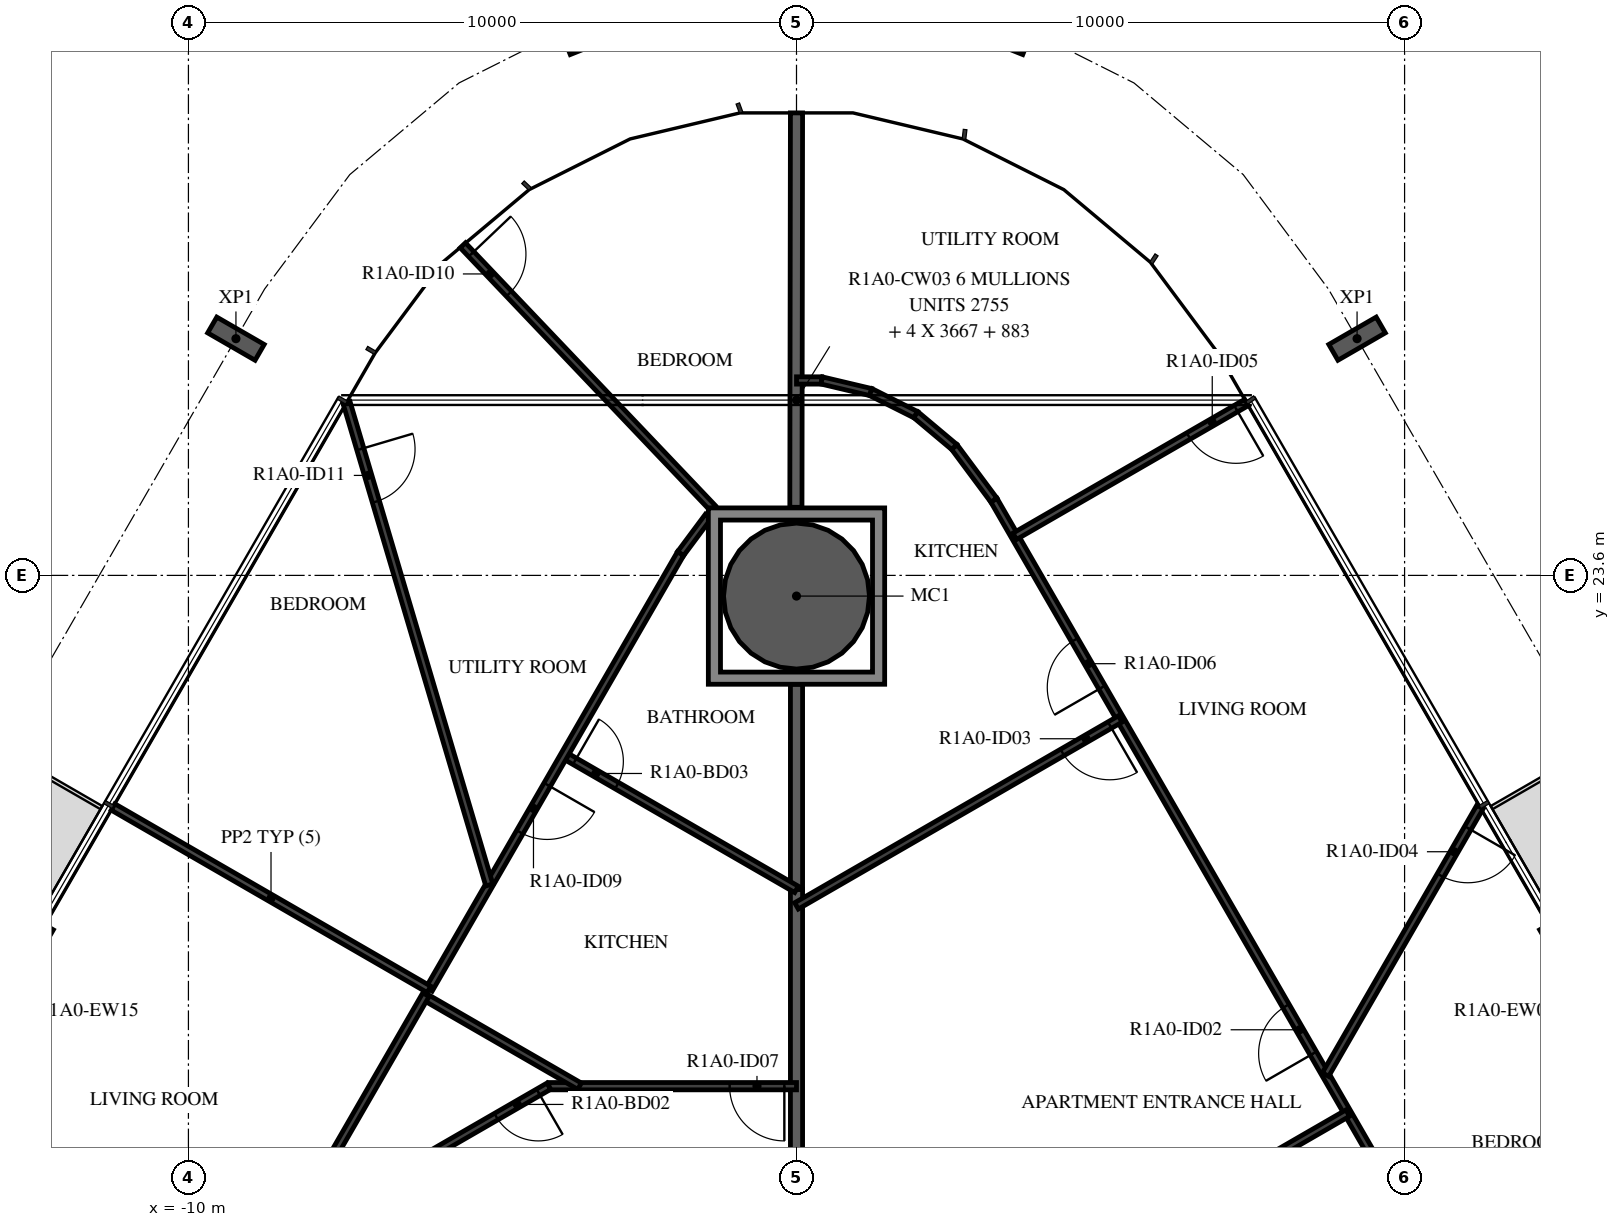
"""IFC4 building model, lengths in metres.
Left out: names, types, materials, properties, quantities, classifications, styles, units other than length and angle.
Written with IfcOpenShell. Run it as: python <this file> out.ifc"""

import sys

from ifc_helpers import new_model, si_unit, direction, frame, frame_2d, origin, origin_2d, place, context, subcontext, project, spatial, polyline, rectangle, hollow_circle, i_section, outline, extrude, element, fill, save


model = new_model("IFC4")
c1 = context("Model", 3, precision=1e-05, world=origin(), true_north=direction((0.0, 1.0)))
c2 = subcontext(c1, "Body", "Model", "MODEL_VIEW")
j1 = project(units=[si_unit("LENGTHUNIT", "METRE"), si_unit("PLANEANGLEUNIT", "RADIAN")], contexts=[c1])
p1 = place(None, origin())
s1 = spatial("IfcSite", under=j1, at=p1, CompositionType="ELEMENT")
p2 = place(p1, origin())
s2 = spatial("IfcBuilding", under=s1, at=p2, CompositionType="ELEMENT")
p3 = place(p2, frame((0.0, 0.0, 45.4)))
s3 = spatial("IfcBuildingStorey", under=s2, at=p3, CompositionType="ELEMENT", Elevation=45.4)
p4 = place(p3, frame((0.0, 23.26, -0.38), z_axis=(0.0, 0.0, 1.0), x_axis=(1.0, 0.0, 0.0)))
e1 = element("IfcColumn", 1, at=p4, inside=s3, PredefinedType="COLUMN", context=c2, shape_type="SweptSolid", body=[
    extrude(hollow_circle(Radius=1.2, WallThickness=0.06, at=origin_2d()), origin(), (0.0, 0.0, 1.0), 3.5),
])
for number, where, z_axis, x_axis in (
    (2, (9.219, 27.493, -0.38), (0.0, 0.0, 1.0), (0.5, -0.866, 0.0)),
    (3, (3.748, 32.639, -0.38), (0.0, 0.0, 1.0), (0.929, -0.371, 0.0)),
    (4, (-3.748, 32.639, -0.38), (0.0, 0.0, 1.0), (0.929, 0.371, 0.0)),
    (5, (-9.219, 27.493, -0.38), (0.0, 0.0, 1.0), (0.5, 0.866, 0.0)),
):
    element("IfcColumn", number, at=place(p3, frame(where, z_axis=z_axis, x_axis=x_axis)), inside=s3, PredefinedType="COLUMN", context=c2, shape_type="SweptSolid", body=[
        extrude(i_section(OverallWidth=0.3, OverallDepth=0.9, WebThickness=0.019, FlangeThickness=0.035, FilletRadius=0.03, at=origin_2d()), origin(), (0.0, 0.0, 1.0), 3.5),
    ])
p5 = place(p3, frame((13.891, 15.041, 0.0), z_axis=(0.0, 0.0, 1.0), x_axis=(-0.499971222258, 0.866042017984, 0.0)))
e6 = element("IfcWall", 6, at=p5, inside=s3, PredefinedType="STANDARD", context=c2, shape_type="SweptSolid", body=[
    extrude(rectangle(XDim=3.2, YDim=0.16, at=frame_2d((1.6, 0.0))), origin(), (0.0, 0.0, 1.0), 3.12),
])
p6 = place(p5, frame((0.4, 0.0, 0.0)))
e7 = element("IfcOpeningElement", 7, at=p6, cuts=e6, PredefinedType="OPENING", context=c2, shape_type="SweptSolid", body=[
    extrude(rectangle(XDim=2.4, YDim=2.4, at=frame_2d((1.2, 1.2))), frame((0.0, 0.09, 0.0), z_axis=(0.0, -1.0, 0.0), x_axis=(1.0, 0.0, 0.0)), (0.0, 0.0, 1.0), 0.18),
])
p7 = place(p3, frame((-12.291, 17.812, 0.0), z_axis=(0.0, 0.0, 1.0), x_axis=(-0.499971222258, -0.866042017984, 0.0)))
e8 = element("IfcWall", 8, at=p7, inside=s3, PredefinedType="STANDARD", context=c2, shape_type="SweptSolid", body=[
    extrude(rectangle(XDim=3.2, YDim=0.16, at=frame_2d((1.6, 0.0))), origin(), (0.0, 0.0, 1.0), 3.12),
])
p8 = place(p7, frame((0.4, 0.0, 0.0)))
e9 = element("IfcOpeningElement", 9, at=p8, cuts=e8, PredefinedType="OPENING", context=c2, shape_type="SweptSolid", body=[
    extrude(rectangle(XDim=2.4, YDim=2.4, at=frame_2d((1.2, 1.2))), frame((0.0, 0.09, 0.0), z_axis=(0.0, -1.0, 0.0), x_axis=(1.0, 0.0, 0.0)), (0.0, 0.0, 1.0), 0.18),
])
p9 = place(p3, frame((0.0, 18.437, 0.0), z_axis=(0.0, 0.0, 1.0), x_axis=(0.0, -1.0, 0.0)))
e10 = element("IfcWall", 10, at=p9, inside=s3, PredefinedType="STANDARD", context=c2, shape_type="SweptSolid", body=[
    extrude(rectangle(XDim=4.737, YDim=0.2, at=frame_2d((2.368, 0.0))), origin(), (0.0, 0.0, 1.0), 3.12),
])
p10 = place(p3, frame((0.0, 31.206, 0.0), z_axis=(0.0, 0.0, 1.0), x_axis=(-0.001543266126, -0.999998809164, 0.0)))
e11 = element("IfcWall", 11, at=p10, inside=s3, PredefinedType="STANDARD", context=c2, shape_type="SweptSolid", body=[
    extrude(rectangle(XDim=6.486, YDim=0.2, at=frame_2d((3.243, 0.0))), origin(), (0.0, 0.0, 1.0), 3.12),
])
p11 = place(p3, frame((0.0, 21.81, 0.0), z_axis=(0.0, 0.0, 1.0), x_axis=(0.0, -1.0, 0.0)))
e12 = element("IfcWall", 12, at=p11, inside=s3, PredefinedType="STANDARD", context=c2, shape_type="SweptSolid", body=[
    extrude(rectangle(XDim=3.373, YDim=0.2, at=frame_2d((1.687, 0.0))), origin(), (0.0, 0.0, 1.0), 3.12),
])
p12 = place(p3, frame((11.139, 11.167, 0.0), z_axis=(0.0, 0.0, 1.0), x_axis=(-0.499994660107, 0.866028486751, 0.0)))
e13 = element("IfcWall", 13, at=p12, inside=s3, PredefinedType="PARTITIONING", context=c2, shape_type="SweptSolid", body=[
    extrude(rectangle(XDim=15.786, YDim=0.12, at=frame_2d((7.893, 0.0))), origin(), (0.0, 0.0, 1.0), 3.12),
])
p13 = place(p12, frame((5.279, 0.0, 0.0)))
e14 = element("IfcOpeningElement", 14, at=p13, cuts=e13, PredefinedType="OPENING", context=c2, shape_type="SweptSolid", body=[
    extrude(rectangle(XDim=0.9, YDim=2.1, at=frame_2d((0.45, 1.05))), frame((0.0, 0.07, 0.0), z_axis=(0.0, -1.0, 0.0), x_axis=(1.0, 0.0, 0.0)), (0.0, 0.0, 1.0), 0.14),
])
p14 = place(p12, frame((12.23, 0.0, 0.0)))
e15 = element("IfcOpeningElement", 15, at=p14, cuts=e13, PredefinedType="OPENING", context=c2, shape_type="SweptSolid", body=[
    extrude(rectangle(XDim=0.9, YDim=2.1, at=frame_2d((0.45, 1.05))), frame((0.0, 0.07, 0.0), z_axis=(0.0, -1.0, 0.0), x_axis=(1.0, 0.0, 0.0)), (0.0, 0.0, 1.0), 0.14),
])
p15 = place(p3, frame((6.952, 13.538, 0.0), z_axis=(0.0, 0.0, 1.0), x_axis=(0.866030657337, 0.49999090047, 0.0)))
e16 = element("IfcWall", 16, at=p15, inside=s3, PredefinedType="PARTITIONING", context=c2, shape_type="SweptSolid", body=[
    extrude(rectangle(XDim=2.44, YDim=0.12, at=frame_2d((1.22, 0.0))), origin(), (0.0, 0.0, 1.0), 3.12),
])
p16 = place(p3, frame((5.324, 21.239, 0.0), z_axis=(0.0, 0.0, 1.0), x_axis=(-0.866030172657, -0.49999173998, 0.0)))
e17 = element("IfcWall", 17, at=p16, inside=s3, PredefinedType="PARTITIONING", context=c2, shape_type="SweptSolid", body=[
    extrude(rectangle(XDim=6.147, YDim=0.12, at=frame_2d((3.074, 0.0))), origin(), (0.0, 0.0, 1.0), 3.12),
])
p17 = place(p16, frame((0.2, 0.0, 0.0)))
e18 = element("IfcOpeningElement", 18, at=p17, cuts=e17, PredefinedType="OPENING", context=c2, shape_type="SweptSolid", body=[
    extrude(rectangle(XDim=0.9, YDim=2.1, at=frame_2d((0.45, 1.05))), frame((0.0, 0.07, 0.0), z_axis=(0.0, -1.0, 0.0), x_axis=(1.0, 0.0, 0.0)), (0.0, 0.0, 1.0), 0.14),
])
p18 = place(p3, frame((11.24, 19.792, 0.0), z_axis=(0.0, 0.0, 1.0), x_axis=(-0.499978956711, -0.866037552792, 0.0)))
e19 = element("IfcWall", 19, at=p18, inside=s3, PredefinedType="PARTITIONING", context=c2, shape_type="SweptSolid", body=[
    extrude(rectangle(XDim=5.081, YDim=0.12, at=frame_2d((2.541, 0.0))), origin(), (0.0, 0.0, 1.0), 3.12),
])
p19 = place(p18, frame((0.4, 0.0, 0.0)))
e20 = element("IfcOpeningElement", 20, at=p19, cuts=e19, PredefinedType="OPENING", context=c2, shape_type="SweptSolid", body=[
    extrude(rectangle(XDim=0.9, YDim=2.1, at=frame_2d((0.45, 1.05))), frame((0.0, 0.07, 0.0), z_axis=(0.0, -1.0, 0.0), x_axis=(1.0, 0.0, 0.0)), (0.0, 0.0, 1.0), 0.14),
])
p20 = place(p3, frame((7.4, 26.443, 0.0), z_axis=(0.0, 0.0, 1.0), x_axis=(-0.866032203192, -0.499988222896, 0.0)))
e21 = element("IfcWall", 21, at=p20, inside=s3, PredefinedType="PARTITIONING", context=c2, shape_type="SweptSolid", body=[
    extrude(rectangle(XDim=4.4, YDim=0.12, at=frame_2d((2.2, 0.0))), origin(), (0.0, 0.0, 1.0), 2.73),
])
p21 = place(p20, frame((0.2, 0.0, 0.0)))
e22 = element("IfcOpeningElement", 22, at=p21, cuts=e21, PredefinedType="OPENING", context=c2, shape_type="SweptSolid", body=[
    extrude(rectangle(XDim=0.9, YDim=2.1, at=frame_2d((0.45, 1.05))), frame((0.0, 0.07, 0.0), z_axis=(0.0, -1.0, 0.0), x_axis=(1.0, 0.0, 0.0)), (0.0, 0.0, 1.0), 0.14),
])
p22 = place(p3, frame((0.0, 26.806, 0.0), z_axis=(0.0, 0.0, 1.0), x_axis=(1.0, 0.0, 0.0)))
e23 = element("IfcWall", 23, at=p22, inside=s3, PredefinedType="PARTITIONING", context=c2, shape_type="SweptSolid", body=[
    extrude(rectangle(XDim=0.415, YDim=0.12, at=frame_2d((0.207, 0.0))), origin(), (0.0, 0.0, 1.0), 3.12),
])
p23 = place(p3, frame((0.415, 26.806, 0.0), z_axis=(0.0, 0.0, 1.0), x_axis=(0.973048993259, -0.230598475097, 0.0)))
e24 = element("IfcWall", 24, at=p23, inside=s3, PredefinedType="PARTITIONING", context=c2, shape_type="SweptSolid", body=[
    extrude(rectangle(XDim=0.829, YDim=0.12, at=frame_2d((0.415, 0.0))), origin(), (0.0, 0.0, 1.0), 3.12),
])
for number, where, z_axis, x_axis in (
    (25, (1.221, 26.615, 0.0), (0.0, 0.0, 1.0), (0.894, -0.449, 0.0)),
    (26, (1.962, 26.243, 0.0), (0.0, 0.0, 1.0), (0.766, -0.643, 0.0)),
):
    element("IfcWall", number, at=place(p3, frame(where, z_axis=z_axis, x_axis=x_axis)), inside=s3, PredefinedType="PARTITIONING", context=c2, shape_type="SweptSolid", body=[
        extrude(rectangle(XDim=0.829, YDim=0.12, at=frame_2d((0.415, 0.0))), origin(), (0.0, 0.0, 1.0), 3.12),
    ])
p24 = place(p3, frame((2.597, 25.71, 0.0), z_axis=(0.0, 0.0, 1.0), x_axis=(0.59722925597, -0.802070580319, 0.0)))
e27 = element("IfcWall", 27, at=p24, inside=s3, PredefinedType="PARTITIONING", context=c2, shape_type="SweptSolid", body=[
    extrude(rectangle(XDim=1.087, YDim=0.12, at=frame_2d((0.543, 0.0))), origin(), (0.0, 0.0, 1.0), 3.12),
])
p25 = place(p3, frame((0.0, 15.2, 0.0), z_axis=(0.0, 0.0, 1.0), x_axis=(-1.0, 0.0, 0.0)))
e28 = element("IfcWall", 28, at=p25, inside=s3, PredefinedType="PARTITIONING", context=c2, shape_type="SweptSolid", body=[
    extrude(rectangle(XDim=4.073, YDim=0.12, at=frame_2d((2.036, 0.0))), origin(), (0.0, 0.0, 1.0), 3.12),
])
p26 = place(p25, frame((0.2, 0.0, 0.0)))
e29 = element("IfcOpeningElement", 29, at=p26, cuts=e28, PredefinedType="OPENING", context=c2, shape_type="SweptSolid", body=[
    extrude(rectangle(XDim=0.9, YDim=2.1, at=frame_2d((0.45, 1.05))), frame((0.0, 0.07, 0.0), z_axis=(0.0, -1.0, 0.0), x_axis=(1.0, 0.0, 0.0)), (0.0, 0.0, 1.0), 0.14),
])
p27 = place(p3, frame((-4.073, 15.2, 0.0), z_axis=(0.0, 0.0, 1.0), x_axis=(-0.866024802457, -0.500001041529, 0.0)))
e30 = element("IfcWall", 30, at=p27, inside=s3, PredefinedType="PARTITIONING", context=c2, shape_type="SweptSolid", body=[
    extrude(rectangle(XDim=6.751, YDim=0.12, at=frame_2d((3.376, 0.0))), origin(), (0.0, 0.0, 1.0), 3.12),
])
p28 = place(p27, frame((0.2, 0.0, 0.0)))
e31 = element("IfcOpeningElement", 31, at=p28, cuts=e30, PredefinedType="OPENING", context=c2, shape_type="SweptSolid", body=[
    extrude(rectangle(XDim=0.8, YDim=2.1, at=frame_2d((0.4, 1.05))), frame((0.0, 0.07, 0.0), z_axis=(0.0, -1.0, 0.0), x_axis=(1.0, 0.0, 0.0)), (0.0, 0.0, 1.0), 0.14),
])
p29 = place(p27, frame((5.206, 0.0, 0.0)))
e32 = element("IfcOpeningElement", 32, at=p29, cuts=e30, PredefinedType="OPENING", context=c2, shape_type="SweptSolid", body=[
    extrude(rectangle(XDim=0.9, YDim=2.1, at=frame_2d((0.45, 1.05))), frame((0.0, 0.07, 0.0), z_axis=(0.0, -1.0, 0.0), x_axis=(1.0, 0.0, 0.0)), (0.0, 0.0, 1.0), 0.14),
])
p30 = place(p3, frame((-5.487, 29.028, 0.0), z_axis=(0.0, 0.0, 1.0), x_axis=(0.689189638576, -0.724581011398, 0.0)))
e33 = element("IfcWall", 33, at=p30, inside=s3, PredefinedType="PARTITIONING", context=c2, shape_type="SweptSolid", body=[
    extrude(rectangle(XDim=5.96, YDim=0.12, at=frame_2d((2.98, 0.0))), origin(), (0.0, 0.0, 1.0), 3.12),
])
p31 = place(p30, frame((0.2, 0.0, 0.0)))
e34 = element("IfcOpeningElement", 34, at=p31, cuts=e33, PredefinedType="OPENING", context=c2, shape_type="SweptSolid", body=[
    extrude(rectangle(XDim=0.9, YDim=2.1, at=frame_2d((0.45, 1.05))), frame((0.0, 0.07, 0.0), z_axis=(0.0, -1.0, 0.0), x_axis=(1.0, 0.0, 0.0)), (0.0, 0.0, 1.0), 0.14),
])
p32 = place(p3, frame((-3.821, 20.643, 0.0), z_axis=(0.0, 0.0, 1.0), x_axis=(0.866024310165, -0.5000018942, 0.0)))
e35 = element("IfcWall", 35, at=p32, inside=s3, PredefinedType="PARTITIONING", context=c2, shape_type="SweptSolid", body=[
    extrude(rectangle(XDim=4.412, YDim=0.12, at=frame_2d((2.206, 0.0))), origin(), (0.0, 0.0, 1.0), 3.12),
])
p33 = place(p32, frame((0.2, 0.0, 0.0)))
e36 = element("IfcOpeningElement", 36, at=p33, cuts=e35, PredefinedType="OPENING", context=c2, shape_type="SweptSolid", body=[
    extrude(rectangle(XDim=0.8, YDim=2.1, at=frame_2d((0.4, 1.05))), frame((0.0, 0.07, 0.0), z_axis=(0.0, -1.0, 0.0), x_axis=(1.0, 0.0, 0.0)), (0.0, 0.0, 1.0), 0.14),
])
p34 = place(p3, frame((-1.45, 24.571, 0.0), z_axis=(0.0, 0.0, 1.0), x_axis=(-0.597187509737, -0.802101663266, 0.0)))
e37 = element("IfcWall", 37, at=p34, inside=s3, PredefinedType="PARTITIONING", context=c2, shape_type="SweptSolid", body=[
    extrude(rectangle(XDim=0.765, YDim=0.12, at=frame_2d((0.382, 0.0))), origin(), (0.0, 0.0, 1.0), 3.12),
])
p35 = place(p3, frame((-1.907, 23.957, 0.0), z_axis=(0.0, 0.0, 1.0), x_axis=(-0.499994901178, -0.866028347571, 0.0)))
e38 = element("IfcWall", 38, at=p35, inside=s3, PredefinedType="PARTITIONING", context=c2, shape_type="SweptSolid", body=[
    extrude(rectangle(XDim=8.274, YDim=0.12, at=frame_2d((4.137, 0.0))), origin(), (0.0, 0.0, 1.0), 3.12),
])
p36 = place(p35, frame((4.387, 0.0, 0.0)))
e39 = element("IfcOpeningElement", 39, at=p36, cuts=e38, PredefinedType="OPENING", context=c2, shape_type="SweptSolid", body=[
    extrude(rectangle(XDim=0.9, YDim=2.1, at=frame_2d((0.45, 1.05))), frame((0.0, 0.07, 0.0), z_axis=(0.0, -1.0, 0.0), x_axis=(1.0, 0.0, 0.0)), (0.0, 0.0, 1.0), 0.14),
])
p37 = place(p3, frame((-6.114, 16.67, 0.0), z_axis=(0.0, 0.0, 1.0), x_axis=(0.866011328839, -0.500024377727, 0.0)))
e40 = element("IfcWall", 40, at=p37, inside=s3, PredefinedType="PARTITIONING", context=c2, shape_type="SweptSolid", body=[
    extrude(rectangle(XDim=2.94, YDim=0.12, at=frame_2d((1.47, 0.0))), origin(), (0.0, 0.0, 1.0), 3.12),
])
p38 = place(p3, frame((-7.4, 26.443, 0.0), z_axis=(0.0, 0.0, 1.0), x_axis=(0.283777867447, -0.95889004685, 0.0)))
e41 = element("IfcWall", 41, at=p38, inside=s3, PredefinedType="PARTITIONING", context=c2, shape_type="SweptSolid", body=[
    extrude(rectangle(XDim=8.274, YDim=0.12, at=frame_2d((4.137, 0.0))), origin(), (0.0, 0.0, 1.0), 3.12),
])
p39 = place(p38, frame((0.8, 0.0, 0.0)))
e42 = element("IfcOpeningElement", 42, at=p39, cuts=e41, PredefinedType="OPENING", context=c2, shape_type="SweptSolid", body=[
    extrude(rectangle(XDim=0.9, YDim=2.1, at=frame_2d((0.45, 1.05))), frame((0.0, 0.07, 0.0), z_axis=(0.0, -1.0, 0.0), x_axis=(1.0, 0.0, 0.0)), (0.0, 0.0, 1.0), 0.14),
])
p40 = place(p3, frame((-11.24, 19.792, 0.0), z_axis=(0.0, 0.0, 1.0), x_axis=(0.866031096941, -0.499990139034, 0.0)))
e43 = element("IfcWall", 43, at=p40, inside=s3, PredefinedType="PARTITIONING", context=c2, shape_type="SweptSolid", body=[
    extrude(rectangle(XDim=6.0, YDim=0.12, at=frame_2d((3.0, 0.0))), origin(), (0.0, 0.0, 1.0), 2.73),
])
p41 = place(p3, frame((-6.094, 16.705, 0.0), z_axis=(0.0, 0.0, 1.0), x_axis=(-0.500014747178, -0.86601688933, 0.0)))
e44 = element("IfcWall", 44, at=p41, inside=s3, PredefinedType="PARTITIONING", context=c2, shape_type="SweptSolid", body=[
    extrude(rectangle(XDim=4.627, YDim=0.12, at=frame_2d((2.313, 0.0))), origin(), (0.0, 0.0, 1.0), 3.12),
])
p42 = place(p3, origin())
e45 = element("IfcWall", 45, at=p42, inside=s3, PredefinedType="STANDARD", context=c2, shape_type="SweptSolid", body=[
    extrude(outline(polyline([(1.45, 24.71), (1.45, 21.81), (-1.45, 21.81), (-1.45, 24.71), (1.45, 24.71)]), holes=[polyline([(-1.25, 22.01), (1.25, 22.01), (1.25, 24.51), (-1.25, 24.51), (-1.25, 22.01)])]), origin(), (0.0, 0.0, 1.0), 3.12),
])
p43 = place(p13, origin())
e46 = element("IfcDoor", 46, at=p43, inside=s3, OperationType="SINGLE_SWING_RIGHT", PredefinedType="DOOR", context=c2, shape_type="SweptSolid", body=[
    extrude(rectangle(XDim=0.9, YDim=2.1, at=frame_2d((0.45, 1.05))), frame((0.0, 0.025, 0.0), z_axis=(0.0, -1.0, 0.0), x_axis=(1.0, 0.0, 0.0)), (0.0, 0.0, 1.0), 0.05),
])
fill(e14, e46)
p44 = place(p17, origin())
e47 = element("IfcDoor", 47, at=p44, inside=s3, OperationType="SINGLE_SWING_RIGHT", PredefinedType="DOOR", context=c2, shape_type="SweptSolid", body=[
    extrude(rectangle(XDim=0.9, YDim=2.1, at=frame_2d((0.45, 1.05))), frame((0.0, 0.025, 0.0), z_axis=(0.0, -1.0, 0.0), x_axis=(1.0, 0.0, 0.0)), (0.0, 0.0, 1.0), 0.05),
])
fill(e18, e47)
p45 = place(p19, origin())
e48 = element("IfcDoor", 48, at=p45, inside=s3, OperationType="SINGLE_SWING_LEFT", PredefinedType="DOOR", context=c2, shape_type="SweptSolid", body=[
    extrude(rectangle(XDim=0.9, YDim=2.1, at=frame_2d((0.45, 1.05))), frame((0.0, 0.025, 0.0), z_axis=(0.0, -1.0, 0.0), x_axis=(1.0, 0.0, 0.0)), (0.0, 0.0, 1.0), 0.05),
])
fill(e20, e48)
p46 = place(p21, origin())
e49 = element("IfcDoor", 49, at=p46, inside=s3, OperationType="SINGLE_SWING_RIGHT", PredefinedType="DOOR", context=c2, shape_type="SweptSolid", body=[
    extrude(rectangle(XDim=0.9, YDim=2.1, at=frame_2d((0.45, 1.05))), frame((0.0, 0.025, 0.0), z_axis=(0.0, -1.0, 0.0), x_axis=(1.0, 0.0, 0.0)), (0.0, 0.0, 1.0), 0.05),
])
fill(e22, e49)
p47 = place(p14, origin())
e50 = element("IfcDoor", 50, at=p47, inside=s3, OperationType="SINGLE_SWING_LEFT", PredefinedType="DOOR", context=c2, shape_type="SweptSolid", body=[
    extrude(rectangle(XDim=0.9, YDim=2.1, at=frame_2d((0.45, 1.05))), frame((0.0, 0.025, 0.0), z_axis=(0.0, -1.0, 0.0), x_axis=(1.0, 0.0, 0.0)), (0.0, 0.0, 1.0), 0.05),
])
fill(e15, e50)
p48 = place(p26, origin())
e51 = element("IfcDoor", 51, at=p48, inside=s3, OperationType="SINGLE_SWING_RIGHT", PredefinedType="DOOR", context=c2, shape_type="SweptSolid", body=[
    extrude(rectangle(XDim=0.9, YDim=2.1, at=frame_2d((0.45, 1.05))), frame((0.0, 0.025, 0.0), z_axis=(0.0, -1.0, 0.0), x_axis=(1.0, 0.0, 0.0)), (0.0, 0.0, 1.0), 0.05),
])
fill(e29, e51)
p49 = place(p28, origin())
e52 = element("IfcDoor", 52, at=p49, inside=s3, OperationType="SINGLE_SWING_LEFT", PredefinedType="DOOR", context=c2, shape_type="SweptSolid", body=[
    extrude(rectangle(XDim=0.8, YDim=2.1, at=frame_2d((0.4, 1.05))), frame((0.0, 0.025, 0.0), z_axis=(0.0, -1.0, 0.0), x_axis=(1.0, 0.0, 0.0)), (0.0, 0.0, 1.0), 0.05),
])
fill(e31, e52)
p50 = place(p33, origin())
e53 = element("IfcDoor", 53, at=p50, inside=s3, OperationType="SINGLE_SWING_LEFT", PredefinedType="DOOR", context=c2, shape_type="SweptSolid", body=[
    extrude(rectangle(XDim=0.8, YDim=2.1, at=frame_2d((0.4, 1.05))), frame((0.0, 0.025, 0.0), z_axis=(0.0, -1.0, 0.0), x_axis=(1.0, 0.0, 0.0)), (0.0, 0.0, 1.0), 0.05),
])
fill(e36, e53)
p51 = place(p36, origin())
e54 = element("IfcDoor", 54, at=p51, inside=s3, OperationType="SINGLE_SWING_LEFT", PredefinedType="DOOR", context=c2, shape_type="SweptSolid", body=[
    extrude(rectangle(XDim=0.9, YDim=2.1, at=frame_2d((0.45, 1.05))), frame((0.0, 0.025, 0.0), z_axis=(0.0, -1.0, 0.0), x_axis=(1.0, 0.0, 0.0)), (0.0, 0.0, 1.0), 0.05),
])
fill(e39, e54)
p52 = place(p31, origin())
e55 = element("IfcDoor", 55, at=p52, inside=s3, OperationType="SINGLE_SWING_LEFT", PredefinedType="DOOR", context=c2, shape_type="SweptSolid", body=[
    extrude(rectangle(XDim=0.9, YDim=2.1, at=frame_2d((0.45, 1.05))), frame((0.0, 0.025, 0.0), z_axis=(0.0, -1.0, 0.0), x_axis=(1.0, 0.0, 0.0)), (0.0, 0.0, 1.0), 0.05),
])
fill(e34, e55)
p53 = place(p39, origin())
e56 = element("IfcDoor", 56, at=p53, inside=s3, OperationType="SINGLE_SWING_RIGHT", PredefinedType="DOOR", context=c2, shape_type="SweptSolid", body=[
    extrude(rectangle(XDim=0.9, YDim=2.1, at=frame_2d((0.45, 1.05))), frame((0.0, 0.025, 0.0), z_axis=(0.0, -1.0, 0.0), x_axis=(1.0, 0.0, 0.0)), (0.0, 0.0, 1.0), 0.05),
])
fill(e42, e56)
save(model, sys.argv[1])
